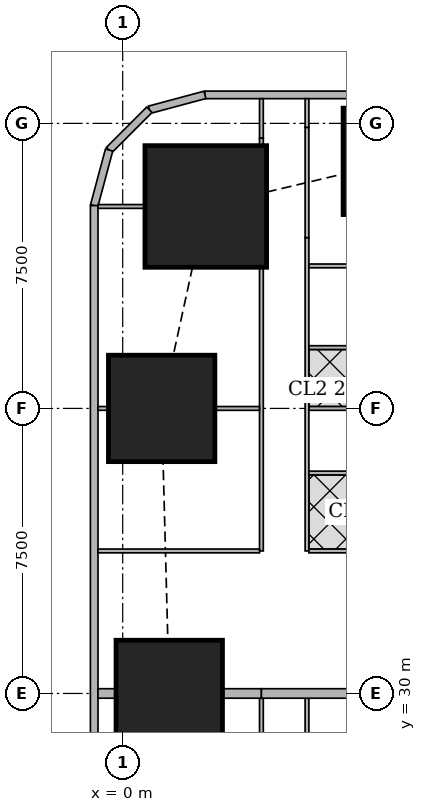
"""IFC4 building model, lengths in metres.
Left out: names, types, materials, properties, quantities, classifications, styles, units other than length and angle.
Written with IfcOpenShell. Run it as: python <this file> out.ifc"""

import sys

from ifc_helpers import new_model, si_unit, direction, frame, frame_2d, origin, origin_2d, place, context, subcontext, project, spatial, rectangle, extrude, element, fill, save


model = new_model("IFC4")
c1 = context("Model", 3, precision=1e-05, world=origin(), true_north=direction((0.0, 1.0)))
c2 = subcontext(c1, "Body", "Model", "MODEL_VIEW")
j1 = project(units=[si_unit("LENGTHUNIT", "METRE"), si_unit("PLANEANGLEUNIT", "RADIAN")], contexts=[c1])
p1 = place(None, origin())
s1 = spatial("IfcSite", under=j1, at=p1, CompositionType="ELEMENT")
p2 = place(p1, origin())
s2 = spatial("IfcBuilding", under=s1, at=p2, CompositionType="ELEMENT")
p3 = place(p2, frame((0.0, 0.0, 42.5)))
s3 = spatial("IfcBuildingStorey", under=s2, at=p3, CompositionType="ELEMENT", Elevation=42.5)
for number, where, z_axis, x_axis in (
    (1, (1.225, 30.0, 0.0), (0.0, 0.0, 1.0), (1.0, 0.0, 0.0)),
    (2, (1.025, 37.5, 0.0), (0.0, 0.0, 1.0), (1.0, 0.0, 0.0)),
):
    element("IfcColumn", number, at=place(p3, frame(where, z_axis=z_axis, x_axis=x_axis)), inside=s3, PredefinedType="COLUMN", context=c2, shape_type="SweptSolid", body=[
        extrude(rectangle(XDim=2.8, YDim=2.8, at=origin_2d()), origin(), (0.0, 0.0, 1.0), 3.75),
    ])
p4 = place(p3, frame((2.186, 42.814, 0.0), z_axis=(0.0, 0.0, 1.0), x_axis=(1.0, 0.0, 0.0)))
e3 = element("IfcColumn", 3, at=p4, inside=s3, PredefinedType="COLUMN", context=c2, shape_type="SweptSolid", body=[
    extrude(rectangle(XDim=3.2, YDim=3.2, at=origin_2d()), origin(), (0.0, 0.0, 1.0), 3.75),
])
p5 = place(p3, frame((7.2, 44.0, 0.0), z_axis=(0.0, 0.0, 1.0), x_axis=(1.0, 0.0, 0.0)))
e4 = element("IfcColumn", 4, at=p5, inside=s3, PredefinedType="COLUMN", context=c2, shape_type="SweptSolid", body=[
    extrude(rectangle(XDim=2.8, YDim=2.8, at=origin_2d()), origin(), (0.0, 0.0, 1.0), 3.75),
])
p6 = place(p3, frame((40.106, 45.75, 0.0), z_axis=(0.0, 0.0, 1.0), x_axis=(-1.0, 0.0, 0.0)))
e5 = element("IfcWall", 5, at=p6, inside=s3, PredefinedType="SOLIDWALL", context=c2, shape_type="SweptSolid", body=[
    extrude(rectangle(XDim=37.943, YDim=0.2, at=frame_2d((18.971, 0.0))), origin(), (0.0, 0.0, 1.0), 3.5),
])
p7 = place(p6, frame((8.606, 0.0, 0.9)))
e6 = element("IfcOpeningElement", 6, at=p7, cuts=e5, PredefinedType="OPENING", context=c2, shape_type="SweptSolid", body=[
    extrude(rectangle(XDim=1.8, YDim=1.5, at=frame_2d((0.9, 0.75))), frame((0.0, 0.11, 0.0), z_axis=(0.0, -1.0, 0.0), x_axis=(1.0, 0.0, 0.0)), (0.0, 0.0, 1.0), 0.22),
])
p8 = place(p6, frame((12.206, 0.0, 0.9)))
e7 = element("IfcOpeningElement", 7, at=p8, cuts=e5, PredefinedType="OPENING", context=c2, shape_type="SweptSolid", body=[
    extrude(rectangle(XDim=1.8, YDim=1.5, at=frame_2d((0.9, 0.75))), frame((0.0, 0.11, 0.0), z_axis=(0.0, -1.0, 0.0), x_axis=(1.0, 0.0, 0.0)), (0.0, 0.0, 1.0), 0.22),
])
p9 = place(p6, frame((15.806, 0.0, 0.9)))
e8 = element("IfcOpeningElement", 8, at=p9, cuts=e5, PredefinedType="OPENING", context=c2, shape_type="SweptSolid", body=[
    extrude(rectangle(XDim=1.8, YDim=1.5, at=frame_2d((0.9, 0.75))), frame((0.0, 0.11, 0.0), z_axis=(0.0, -1.0, 0.0), x_axis=(1.0, 0.0, 0.0)), (0.0, 0.0, 1.0), 0.22),
])
p10 = place(p6, frame((19.406, 0.0, 0.9)))
e9 = element("IfcOpeningElement", 9, at=p10, cuts=e5, PredefinedType="OPENING", context=c2, shape_type="SweptSolid", body=[
    extrude(rectangle(XDim=1.8, YDim=1.5, at=frame_2d((0.9, 0.75))), frame((0.0, 0.11, 0.0), z_axis=(0.0, -1.0, 0.0), x_axis=(1.0, 0.0, 0.0)), (0.0, 0.0, 1.0), 0.22),
])
p11 = place(p6, frame((23.006, 0.0, 0.9)))
e10 = element("IfcOpeningElement", 10, at=p11, cuts=e5, PredefinedType="OPENING", context=c2, shape_type="SweptSolid", body=[
    extrude(rectangle(XDim=1.8, YDim=1.5, at=frame_2d((0.9, 0.75))), frame((0.0, 0.11, 0.0), z_axis=(0.0, -1.0, 0.0), x_axis=(1.0, 0.0, 0.0)), (0.0, 0.0, 1.0), 0.22),
])
p12 = place(p6, frame((26.606, 0.0, 0.9)))
e11 = element("IfcOpeningElement", 11, at=p12, cuts=e5, PredefinedType="OPENING", context=c2, shape_type="SweptSolid", body=[
    extrude(rectangle(XDim=1.8, YDim=1.5, at=frame_2d((0.9, 0.75))), frame((0.0, 0.11, 0.0), z_axis=(0.0, -1.0, 0.0), x_axis=(1.0, 0.0, 0.0)), (0.0, 0.0, 1.0), 0.22),
])
p13 = place(p3, frame((2.163, 45.75, 0.0), z_axis=(0.0, 0.0, 1.0), x_axis=(-0.965832000415, -0.259168954497, 0.0)))
e12 = element("IfcWall", 12, at=p13, inside=s3, PredefinedType="SOLIDWALL", context=c2, shape_type="SweptSolid", body=[
    extrude(rectangle(XDim=1.513, YDim=0.2, at=frame_2d((0.756, 0.0))), origin(), (0.0, 0.0, 1.0), 3.5),
])
p14 = place(p3, frame((0.702, 45.358, 0.0), z_axis=(0.0, 0.0, 1.0), x_axis=(-0.707106781187, -0.707106781187, 0.0)))
e13 = element("IfcWall", 13, at=p14, inside=s3, PredefinedType="SOLIDWALL", context=c2, shape_type="SweptSolid", body=[
    extrude(rectangle(XDim=1.499, YDim=0.2, at=frame_2d((0.75, 0.0))), origin(), (0.0, 0.0, 1.0), 3.5),
])
p15 = place(p3, frame((-0.358, 44.298, 0.0), z_axis=(0.0, 0.0, 1.0), x_axis=(-0.259168954497, -0.965832000415, 0.0)))
e14 = element("IfcWall", 14, at=p15, inside=s3, PredefinedType="SOLIDWALL", context=c2, shape_type="SweptSolid", body=[
    extrude(rectangle(XDim=1.513, YDim=0.2, at=frame_2d((0.756, 0.0))), origin(), (0.0, 0.0, 1.0), 3.5),
])
p16 = place(p3, frame((-0.75, 42.837, 0.0), z_axis=(0.0, 0.0, 1.0), x_axis=(0.0, -1.0, 0.0)))
e15 = element("IfcWall", 15, at=p16, inside=s3, PredefinedType="SOLIDWALL", context=c2, shape_type="SweptSolid", body=[
    extrude(rectangle(XDim=40.674, YDim=0.2, at=frame_2d((20.337, 0.0))), origin(), (0.0, 0.0, 1.0), 3.5),
])
p17 = place(p16, frame((1.78, 0.0, 0.9)))
e16 = element("IfcOpeningElement", 16, at=p17, cuts=e15, PredefinedType="OPENING", context=c2, shape_type="SweptSolid", body=[
    extrude(rectangle(XDim=1.8, YDim=1.5, at=frame_2d((0.9, 0.75))), frame((0.0, 0.11, 0.0), z_axis=(0.0, -1.0, 0.0), x_axis=(1.0, 0.0, 0.0)), (0.0, 0.0, 1.0), 0.22),
])
p18 = place(p16, frame((6.312, 0.0, 0.9)))
e17 = element("IfcOpeningElement", 17, at=p18, cuts=e15, PredefinedType="OPENING", context=c2, shape_type="SweptSolid", body=[
    extrude(rectangle(XDim=1.8, YDim=1.5, at=frame_2d((0.9, 0.75))), frame((0.0, 0.11, 0.0), z_axis=(0.0, -1.0, 0.0), x_axis=(1.0, 0.0, 0.0)), (0.0, 0.0, 1.0), 0.22),
])
p19 = place(p16, frame((10.062, 0.0, 0.9)))
e18 = element("IfcOpeningElement", 18, at=p19, cuts=e15, PredefinedType="OPENING", context=c2, shape_type="SweptSolid", body=[
    extrude(rectangle(XDim=1.8, YDim=1.5, at=frame_2d((0.9, 0.75))), frame((0.0, 0.11, 0.0), z_axis=(0.0, -1.0, 0.0), x_axis=(1.0, 0.0, 0.0)), (0.0, 0.0, 1.0), 0.22),
])
p20 = place(p16, frame((13.812, 0.0, 0.9)))
e19 = element("IfcOpeningElement", 19, at=p20, cuts=e15, PredefinedType="OPENING", context=c2, shape_type="SweptSolid", body=[
    extrude(rectangle(XDim=1.8, YDim=1.5, at=frame_2d((0.9, 0.75))), frame((0.0, 0.11, 0.0), z_axis=(0.0, -1.0, 0.0), x_axis=(1.0, 0.0, 0.0)), (0.0, 0.0, 1.0), 0.22),
])
p21 = place(p16, frame((17.562, 0.0, 0.9)))
e20 = element("IfcOpeningElement", 20, at=p21, cuts=e15, PredefinedType="OPENING", context=c2, shape_type="SweptSolid", body=[
    extrude(rectangle(XDim=1.8, YDim=1.5, at=frame_2d((0.9, 0.75))), frame((0.0, 0.11, 0.0), z_axis=(0.0, -1.0, 0.0), x_axis=(1.0, 0.0, 0.0)), (0.0, 0.0, 1.0), 0.22),
])
p22 = place(p16, frame((21.312, 0.0, 0.9)))
e21 = element("IfcOpeningElement", 21, at=p22, cuts=e15, PredefinedType="OPENING", context=c2, shape_type="SweptSolid", body=[
    extrude(rectangle(XDim=1.8, YDim=1.5, at=frame_2d((0.9, 0.75))), frame((0.0, 0.11, 0.0), z_axis=(0.0, -1.0, 0.0), x_axis=(1.0, 0.0, 0.0)), (0.0, 0.0, 1.0), 0.22),
])
p23 = place(p16, frame((25.062, 0.0, 0.9)))
e22 = element("IfcOpeningElement", 22, at=p23, cuts=e15, PredefinedType="OPENING", context=c2, shape_type="SweptSolid", body=[
    extrude(rectangle(XDim=1.8, YDim=1.5, at=frame_2d((0.9, 0.75))), frame((0.0, 0.11, 0.0), z_axis=(0.0, -1.0, 0.0), x_axis=(1.0, 0.0, 0.0)), (0.0, 0.0, 1.0), 0.22),
])
p24 = place(p16, frame((28.812, 0.0, 0.9)))
e23 = element("IfcOpeningElement", 23, at=p24, cuts=e15, PredefinedType="OPENING", context=c2, shape_type="SweptSolid", body=[
    extrude(rectangle(XDim=1.8, YDim=1.5, at=frame_2d((0.9, 0.75))), frame((0.0, 0.11, 0.0), z_axis=(0.0, -1.0, 0.0), x_axis=(1.0, 0.0, 0.0)), (0.0, 0.0, 1.0), 0.22),
])
p25 = place(p16, frame((32.562, 0.0, 0.9)))
e24 = element("IfcOpeningElement", 24, at=p25, cuts=e15, PredefinedType="OPENING", context=c2, shape_type="SweptSolid", body=[
    extrude(rectangle(XDim=1.8, YDim=1.5, at=frame_2d((0.9, 0.75))), frame((0.0, 0.11, 0.0), z_axis=(0.0, -1.0, 0.0), x_axis=(1.0, 0.0, 0.0)), (0.0, 0.0, 1.0), 0.22),
])
p26 = place(p16, frame((37.094, 0.0, 0.9)))
e25 = element("IfcOpeningElement", 25, at=p26, cuts=e15, PredefinedType="OPENING", context=c2, shape_type="SweptSolid", body=[
    extrude(rectangle(XDim=1.8, YDim=1.5, at=frame_2d((0.9, 0.75))), frame((0.0, 0.11, 0.0), z_axis=(0.0, -1.0, 0.0), x_axis=(1.0, 0.0, 0.0)), (0.0, 0.0, 1.0), 0.22),
])
p27 = place(p3, frame((3.65, 26.25, 0.0), z_axis=(0.0, 0.0, 1.0), x_axis=(0.0, 1.0, 0.0)))
e26 = element("IfcWall", 26, at=p27, inside=s3, PredefinedType="PARTITIONING", context=c2, shape_type="SweptSolid", body=[
    extrude(rectangle(XDim=3.625, YDim=0.1, at=frame_2d((1.812, 0.0))), origin(), (0.0, 0.0, 1.0), 3.5),
])
p28 = place(p27, frame((0.2, 0.0, 0.0)))
e27 = element("IfcOpeningElement", 27, at=p28, cuts=e26, PredefinedType="OPENING", context=c2, shape_type="SweptSolid", body=[
    extrude(rectangle(XDim=0.9, YDim=2.1, at=frame_2d((0.45, 1.05))), frame((0.0, 0.06, 0.0), z_axis=(0.0, -1.0, 0.0), x_axis=(1.0, 0.0, 0.0)), (0.0, 0.0, 1.0), 0.12),
])
p29 = place(p3, frame((4.85, 26.25, 0.0), z_axis=(0.0, 0.0, 1.0), x_axis=(0.0, 1.0, 0.0)))
e28 = element("IfcWall", 28, at=p29, inside=s3, PredefinedType="PARTITIONING", context=c2, shape_type="SweptSolid", body=[
    extrude(rectangle(XDim=3.625, YDim=0.1, at=frame_2d((1.812, 0.0))), origin(), (0.0, 0.0, 1.0), 3.5),
])
p30 = place(p29, frame((0.575, 0.0, 0.0)))
e29 = element("IfcOpeningElement", 29, at=p30, cuts=e28, PredefinedType="OPENING", context=c2, shape_type="SweptSolid", body=[
    extrude(rectangle(XDim=0.9, YDim=2.1, at=frame_2d((0.45, 1.05))), frame((0.0, 0.06, 0.0), z_axis=(0.0, -1.0, 0.0), x_axis=(1.0, 0.0, 0.0)), (0.0, 0.0, 1.0), 0.12),
])
p31 = place(p29, frame((2.45, 0.0, 0.0)))
e30 = element("IfcOpeningElement", 30, at=p31, cuts=e28, PredefinedType="OPENING", context=c2, shape_type="SweptSolid", body=[
    extrude(rectangle(XDim=0.9, YDim=2.1, at=frame_2d((0.45, 1.05))), frame((0.0, 0.06, 0.0), z_axis=(0.0, -1.0, 0.0), x_axis=(1.0, 0.0, 0.0)), (0.0, 0.0, 1.0), 0.12),
])
p32 = place(p3, frame((3.65, 33.75, 0.0), z_axis=(0.0, 0.0, 1.0), x_axis=(0.0, 1.0, 0.0)))
e31 = element("IfcWall", 31, at=p32, inside=s3, PredefinedType="PARTITIONING", context=c2, shape_type="SweptSolid", body=[
    extrude(rectangle(XDim=7.463, YDim=0.1, at=frame_2d((3.731, 0.0))), origin(), (0.0, 0.0, 1.0), 3.5),
])
p33 = place(p32, frame((0.2, 0.0, 0.0)))
e32 = element("IfcOpeningElement", 32, at=p33, cuts=e31, PredefinedType="OPENING", context=c2, shape_type="SweptSolid", body=[
    extrude(rectangle(XDim=0.9, YDim=2.1, at=frame_2d((0.45, 1.05))), frame((0.0, 0.06, 0.0), z_axis=(0.0, -1.0, 0.0), x_axis=(1.0, 0.0, 0.0)), (0.0, 0.0, 1.0), 0.12),
])
p34 = place(p32, frame((5.2, 0.0, 0.0)))
e33 = element("IfcOpeningElement", 33, at=p34, cuts=e31, PredefinedType="OPENING", context=c2, shape_type="SweptSolid", body=[
    extrude(rectangle(XDim=0.9, YDim=2.1, at=frame_2d((0.45, 1.05))), frame((0.0, 0.06, 0.0), z_axis=(0.0, -1.0, 0.0), x_axis=(1.0, 0.0, 0.0)), (0.0, 0.0, 1.0), 0.12),
])
p35 = place(p3, frame((3.65, 44.415, 0.0), z_axis=(0.0, 0.0, 1.0), x_axis=(0.0, 1.0, 0.0)))
e34 = element("IfcWall", 34, at=p35, inside=s3, PredefinedType="PARTITIONING", context=c2, shape_type="SweptSolid", body=[
    extrude(rectangle(XDim=0.196, YDim=0.1, at=frame_2d((0.098, 0.0))), origin(), (0.0, 0.0, 1.0), 2.05),
])
p36 = place(p3, frame((3.65, 44.611, 0.0), z_axis=(0.0, 0.0, 1.0), x_axis=(0.0, 1.0, 0.0)))
e35 = element("IfcWall", 35, at=p36, inside=s3, PredefinedType="PARTITIONING", context=c2, shape_type="SweptSolid", body=[
    extrude(rectangle(XDim=1.039, YDim=0.1, at=frame_2d((0.52, 0.0))), origin(), (0.0, 0.0, 1.0), 3.5),
])
p37 = place(p3, frame((4.85, 33.75, 0.0), z_axis=(0.0, 0.0, 1.0), x_axis=(0.0, 1.0, 0.0)))
e36 = element("IfcWall", 36, at=p37, inside=s3, PredefinedType="PARTITIONING", context=c2, shape_type="SweptSolid", body=[
    extrude(rectangle(XDim=8.244, YDim=0.1, at=frame_2d((4.122, 0.0))), origin(), (0.0, 0.0, 1.0), 3.5),
])
p38 = place(p37, frame((0.575, 0.0, 0.0)))
e37 = element("IfcOpeningElement", 37, at=p38, cuts=e36, PredefinedType="OPENING", context=c2, shape_type="SweptSolid", body=[
    extrude(rectangle(XDim=0.9, YDim=2.1, at=frame_2d((0.45, 1.05))), frame((0.0, 0.06, 0.0), z_axis=(0.0, -1.0, 0.0), x_axis=(1.0, 0.0, 0.0)), (0.0, 0.0, 1.0), 0.12),
])
p39 = place(p37, frame((4.1, 0.0, 0.0)))
e38 = element("IfcOpeningElement", 38, at=p39, cuts=e36, PredefinedType="OPENING", context=c2, shape_type="SweptSolid", body=[
    extrude(rectangle(XDim=0.9, YDim=2.1, at=frame_2d((0.45, 1.05))), frame((0.0, 0.06, 0.0), z_axis=(0.0, -1.0, 0.0), x_axis=(1.0, 0.0, 0.0)), (0.0, 0.0, 1.0), 0.12),
])
p40 = place(p37, frame((2.45, 0.0, 0.0)))
e39 = element("IfcOpeningElement", 39, at=p40, cuts=e36, PredefinedType="OPENING", context=c2, shape_type="SweptSolid", body=[
    extrude(rectangle(XDim=0.9, YDim=2.1, at=frame_2d((0.45, 1.05))), frame((0.0, 0.06, 0.0), z_axis=(0.0, -1.0, 0.0), x_axis=(1.0, 0.0, 0.0)), (0.0, 0.0, 1.0), 0.12),
])
p41 = place(p37, frame((5.975, 0.0, 0.0)))
e40 = element("IfcOpeningElement", 40, at=p41, cuts=e36, PredefinedType="OPENING", context=c2, shape_type="SweptSolid", body=[
    extrude(rectangle(XDim=0.9, YDim=2.1, at=frame_2d((0.45, 1.05))), frame((0.0, 0.06, 0.0), z_axis=(0.0, -1.0, 0.0), x_axis=(1.0, 0.0, 0.0)), (0.0, 0.0, 1.0), 0.12),
])
p42 = place(p3, frame((4.85, 41.994, 0.0), z_axis=(0.0, 0.0, 1.0), x_axis=(0.0, 1.0, 0.0)))
e41 = element("IfcWall", 41, at=p42, inside=s3, PredefinedType="PARTITIONING", context=c2, shape_type="SweptSolid", body=[
    extrude(rectangle(XDim=2.901, YDim=0.1, at=frame_2d((1.451, 0.0))), origin(), (0.0, 0.0, 1.0), 2.05),
])
p43 = place(p3, frame((4.85, 44.895, 0.0), z_axis=(0.0, 0.0, 1.0), x_axis=(0.0, 1.0, 0.0)))
e42 = element("IfcWall", 42, at=p43, inside=s3, PredefinedType="PARTITIONING", context=c2, shape_type="SweptSolid", body=[
    extrude(rectangle(XDim=0.755, YDim=0.1, at=frame_2d((0.377, 0.0))), origin(), (0.0, 0.0, 1.0), 3.5),
])
p44 = place(p3, frame((-0.65, 33.75, 0.0), z_axis=(0.0, 0.0, 1.0), x_axis=(1.0, 0.0, 0.0)))
e43 = element("IfcWall", 43, at=p44, inside=s3, PredefinedType="PARTITIONING", context=c2, shape_type="SweptSolid", body=[
    extrude(rectangle(XDim=4.25, YDim=0.1, at=frame_2d((2.125, 0.0))), origin(), (0.0, 0.0, 1.0), 2.05),
])
p45 = place(p3, frame((-0.65, 37.5, 0.0), z_axis=(0.0, 0.0, 1.0), x_axis=(1.0, 0.0, 0.0)))
e44 = element("IfcWall", 44, at=p45, inside=s3, PredefinedType="PARTITIONING", context=c2, shape_type="SweptSolid", body=[
    extrude(rectangle(XDim=0.274, YDim=0.1, at=frame_2d((0.137, 0.0))), origin(), (0.0, 0.0, 1.0), 3.5),
])
p46 = place(p3, frame((2.426, 37.5, 0.0), z_axis=(0.0, 0.0, 1.0), x_axis=(1.0, 0.0, 0.0)))
e45 = element("IfcWall", 45, at=p46, inside=s3, PredefinedType="PARTITIONING", context=c2, shape_type="SweptSolid", body=[
    extrude(rectangle(XDim=1.174, YDim=0.1, at=frame_2d((0.587, 0.0))), origin(), (0.0, 0.0, 1.0), 2.05),
])
p47 = place(p3, frame((-0.65, 42.814, 0.0), z_axis=(0.0, 0.0, 1.0), x_axis=(1.0, 0.0, 0.0)))
e46 = element("IfcWall", 46, at=p47, inside=s3, PredefinedType="PARTITIONING", context=c2, shape_type="SweptSolid", body=[
    extrude(rectangle(XDim=1.235, YDim=0.1, at=frame_2d((0.617, 0.0))), origin(), (0.0, 0.0, 1.0), 3.5),
])
p48 = place(p3, frame((4.9, 33.75, 0.0), z_axis=(0.0, 0.0, 1.0), x_axis=(1.0, 0.0, 0.0)))
e47 = element("IfcWall", 47, at=p48, inside=s3, PredefinedType="PARTITIONING", context=c2, shape_type="SweptSolid", body=[
    extrude(rectangle(XDim=3.525, YDim=0.1, at=frame_2d((1.763, 0.0))), origin(), (0.0, 0.0, 1.0), 3.5),
])
p49 = place(p3, frame((4.9, 37.5, 0.0), z_axis=(0.0, 0.0, 1.0), x_axis=(1.0, 0.0, 0.0)))
e48 = element("IfcWall", 48, at=p49, inside=s3, PredefinedType="PARTITIONING", context=c2, shape_type="SweptSolid", body=[
    extrude(rectangle(XDim=1.399, YDim=0.1, at=frame_2d((0.7, 0.0))), origin(), (0.0, 0.0, 1.0), 3.5),
])
for number, where, z_axis, x_axis in (
    (49, (4.9, 41.25, 0.0), (0.0, 0.0, 1.0), (1.0, 0.0, 0.0)),
    (50, (4.9, 35.8, 0.0), (0.0, 0.0, 1.0), (1.0, 0.0, 0.0)),
    (51, (4.9, 39.1, 0.0), (0.0, 0.0, 1.0), (1.0, 0.0, 0.0)),
):
    element("IfcWall", number, at=place(p3, frame(where, z_axis=z_axis, x_axis=x_axis)), inside=s3, PredefinedType="PARTITIONING", context=c2, shape_type="SweptSolid", body=[
        extrude(rectangle(XDim=3.525, YDim=0.1, at=frame_2d((1.763, 0.0))), origin(), (0.0, 0.0, 1.0), 3.5),
    ])
p50 = place(p3, frame((-0.65, 30.0, 0.0), z_axis=(0.0, 0.0, 1.0), x_axis=(1.0, 0.0, 0.0)))
e52 = element("IfcWall", 52, at=p50, inside=s3, PredefinedType="SOLIDWALL", context=c2, shape_type="SweptSolid", body=[
    extrude(rectangle(XDim=0.474, YDim=0.25, at=frame_2d((0.237, 0.0))), origin(), (0.0, 0.0, 1.0), 3.5),
])
p51 = place(p3, frame((2.626, 30.0, 0.0), z_axis=(0.0, 0.0, 1.0), x_axis=(1.0, 0.0, 0.0)))
e53 = element("IfcWall", 53, at=p51, inside=s3, PredefinedType="SOLIDWALL", context=c2, shape_type="SweptSolid", body=[
    extrude(rectangle(XDim=1.024, YDim=0.25, at=frame_2d((0.512, 0.0))), origin(), (0.0, 0.0, 1.0), 3.5),
])
p52 = place(p3, frame((3.65, 30.0, 0.0), z_axis=(0.0, 0.0, 1.0), x_axis=(1.0, 0.0, 0.0)))
e54 = element("IfcWall", 54, at=p52, inside=s3, PredefinedType="SOLIDWALL", context=c2, shape_type="SweptSolid", body=[
    extrude(rectangle(XDim=2.649, YDim=0.25, at=frame_2d((1.325, 0.0))), origin(), (0.0, 0.0, 1.0), 3.5),
])
p53 = place(p17, origin())
e55 = element("IfcWindow", 55, at=p53, inside=s3, PartitioningType="SINGLE_PANEL", PredefinedType="WINDOW", context=c2, shape_type="SweptSolid", body=[
    extrude(rectangle(XDim=1.8, YDim=1.5, at=frame_2d((0.9, 0.75))), frame((0.0, 0.03, 0.0), z_axis=(0.0, -1.0, 0.0), x_axis=(1.0, 0.0, 0.0)), (0.0, 0.0, 1.0), 0.06),
])
fill(e16, e55)
p54 = place(p18, origin())
e56 = element("IfcWindow", 56, at=p54, inside=s3, PartitioningType="SINGLE_PANEL", PredefinedType="WINDOW", context=c2, shape_type="SweptSolid", body=[
    extrude(rectangle(XDim=1.8, YDim=1.5, at=frame_2d((0.9, 0.75))), frame((0.0, 0.03, 0.0), z_axis=(0.0, -1.0, 0.0), x_axis=(1.0, 0.0, 0.0)), (0.0, 0.0, 1.0), 0.06),
])
fill(e17, e56)
p55 = place(p19, origin())
e57 = element("IfcWindow", 57, at=p55, inside=s3, PartitioningType="SINGLE_PANEL", PredefinedType="WINDOW", context=c2, shape_type="SweptSolid", body=[
    extrude(rectangle(XDim=1.8, YDim=1.5, at=frame_2d((0.9, 0.75))), frame((0.0, 0.03, 0.0), z_axis=(0.0, -1.0, 0.0), x_axis=(1.0, 0.0, 0.0)), (0.0, 0.0, 1.0), 0.06),
])
fill(e18, e57)
p56 = place(p20, origin())
e58 = element("IfcWindow", 58, at=p56, inside=s3, PartitioningType="SINGLE_PANEL", PredefinedType="WINDOW", context=c2, shape_type="SweptSolid", body=[
    extrude(rectangle(XDim=1.8, YDim=1.5, at=frame_2d((0.9, 0.75))), frame((0.0, 0.03, 0.0), z_axis=(0.0, -1.0, 0.0), x_axis=(1.0, 0.0, 0.0)), (0.0, 0.0, 1.0), 0.06),
])
fill(e19, e58)
p57 = place(p31, origin())
e59 = element("IfcDoor", 59, at=p57, inside=s3, OperationType="SINGLE_SWING_LEFT", PredefinedType="DOOR", context=c2, shape_type="SweptSolid", body=[
    extrude(rectangle(XDim=0.9, YDim=2.1, at=frame_2d((0.45, 1.05))), frame((0.0, 0.025, 0.0), z_axis=(0.0, -1.0, 0.0), x_axis=(1.0, 0.0, 0.0)), (0.0, 0.0, 1.0), 0.05),
])
fill(e30, e59)
p58 = place(p33, origin())
e60 = element("IfcDoor", 60, at=p58, inside=s3, OperationType="SINGLE_SWING_LEFT", PredefinedType="DOOR", context=c2, shape_type="SweptSolid", body=[
    extrude(rectangle(XDim=0.9, YDim=2.1, at=frame_2d((0.45, 1.05))), frame((0.0, 0.025, 0.0), z_axis=(0.0, -1.0, 0.0), x_axis=(1.0, 0.0, 0.0)), (0.0, 0.0, 1.0), 0.05),
])
fill(e32, e60)
p59 = place(p34, origin())
e61 = element("IfcDoor", 61, at=p59, inside=s3, OperationType="SINGLE_SWING_RIGHT", PredefinedType="DOOR", context=c2, shape_type="SweptSolid", body=[
    extrude(rectangle(XDim=0.9, YDim=2.1, at=frame_2d((0.45, 1.05))), frame((0.0, 0.025, 0.0), z_axis=(0.0, -1.0, 0.0), x_axis=(1.0, 0.0, 0.0)), (0.0, 0.0, 1.0), 0.05),
])
fill(e33, e61)
p60 = place(p38, origin())
e62 = element("IfcDoor", 62, at=p60, inside=s3, OperationType="SINGLE_SWING_RIGHT", PredefinedType="DOOR", context=c2, shape_type="SweptSolid", body=[
    extrude(rectangle(XDim=0.9, YDim=2.1, at=frame_2d((0.45, 1.05))), frame((0.0, 0.025, 0.0), z_axis=(0.0, -1.0, 0.0), x_axis=(1.0, 0.0, 0.0)), (0.0, 0.0, 1.0), 0.05),
])
fill(e37, e62)
p61 = place(p39, origin())
e63 = element("IfcDoor", 63, at=p61, inside=s3, OperationType="SINGLE_SWING_LEFT", PredefinedType="DOOR", context=c2, shape_type="SweptSolid", body=[
    extrude(rectangle(XDim=0.9, YDim=2.1, at=frame_2d((0.45, 1.05))), frame((0.0, 0.025, 0.0), z_axis=(0.0, -1.0, 0.0), x_axis=(1.0, 0.0, 0.0)), (0.0, 0.0, 1.0), 0.05),
])
fill(e38, e63)
p62 = place(p40, origin())
e64 = element("IfcDoor", 64, at=p62, inside=s3, OperationType="SINGLE_SWING_LEFT", PredefinedType="DOOR", context=c2, shape_type="SweptSolid", body=[
    extrude(rectangle(XDim=0.9, YDim=2.1, at=frame_2d((0.45, 1.05))), frame((0.0, 0.025, 0.0), z_axis=(0.0, -1.0, 0.0), x_axis=(1.0, 0.0, 0.0)), (0.0, 0.0, 1.0), 0.05),
])
fill(e39, e64)
p63 = place(p41, origin())
e65 = element("IfcDoor", 65, at=p63, inside=s3, OperationType="SINGLE_SWING_RIGHT", PredefinedType="DOOR", context=c2, shape_type="SweptSolid", body=[
    extrude(rectangle(XDim=0.9, YDim=2.1, at=frame_2d((0.45, 1.05))), frame((0.0, 0.025, 0.0), z_axis=(0.0, -1.0, 0.0), x_axis=(1.0, 0.0, 0.0)), (0.0, 0.0, 1.0), 0.05),
])
fill(e40, e65)
save(model, sys.argv[1])
